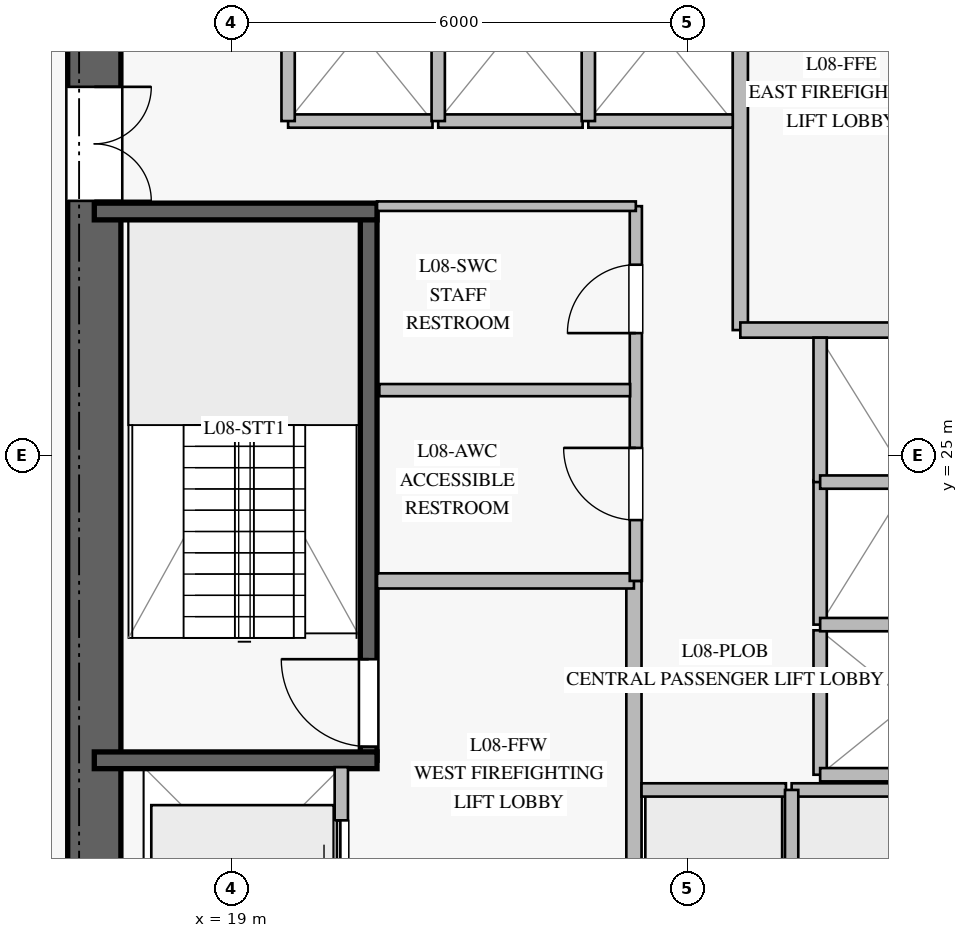
"""IFC4 building model, lengths in metres.
Left out: names, types, materials, properties, quantities, classifications, styles, units other than length and angle.
Written with IfcOpenShell. Run it as: python <this file> out.ifc"""

import sys

from ifc_helpers import new_model, si_unit, direction, frame, frame_2d, origin, place, context, subcontext, project, spatial, rectangle, extrude, element, fill, save


model = new_model("IFC4")
c1 = context("Model", 3, precision=1e-05, world=origin(), true_north=direction((0.0, 1.0)))
c2 = subcontext(c1, "Body", "Model", "MODEL_VIEW")
j1 = project(units=[si_unit("LENGTHUNIT", "METRE"), si_unit("PLANEANGLEUNIT", "RADIAN")], contexts=[c1])
p1 = place(None, origin())
s1 = spatial("IfcSite", under=j1, at=p1, CompositionType="ELEMENT")
p2 = place(p1, origin())
s2 = spatial("IfcBuilding", under=s1, at=p2, CompositionType="ELEMENT")
p3 = place(p2, frame((0.0, 0.0, 36.0)))
s3 = spatial("IfcBuildingStorey", under=s2, at=p3, CompositionType="ELEMENT", Elevation=36.0)
p4 = place(p3, frame((17.2, 31.85, 0.0), z_axis=(0.0, 0.0, 1.0), x_axis=(0.0, -1.0, 0.0)))
e1 = element("IfcWall", 1, at=p4, inside=s3, PredefinedType="SHEAR", context=c2, shape_type="SweptSolid", body=[
    extrude(rectangle(XDim=13.7, YDim=0.7, at=frame_2d((6.85, 0.0))), origin(), (0.0, 0.0, 1.0), 3.76),
])
p5 = place(p4, frame((2.0, 0.0, 0.0)))
e2 = element("IfcOpeningElement", 2, at=p5, cuts=e1, PredefinedType="OPENING", context=c2, shape_type="SweptSolid", body=[
    extrude(rectangle(XDim=1.5, YDim=2.2, at=frame_2d((0.75, 1.1))), frame((0.0, 0.36, 0.0), z_axis=(0.0, -1.0, 0.0), x_axis=(1.0, 0.0, 0.0)), (0.0, 0.0, 1.0), 0.72),
])
p6 = place(p3, frame((20.81, 20.99, 0.0), z_axis=(0.0, 0.0, 1.0), x_axis=(0.0, 1.0, 0.0)))
e3 = element("IfcWall", 3, at=p6, inside=s3, PredefinedType="SOLIDWALL", context=c2, shape_type="SweptSolid", body=[
    extrude(rectangle(XDim=7.22, YDim=0.22, at=frame_2d((3.61, 0.0))), origin(), (0.0, 0.0, 1.0), 3.76),
])
p7 = place(p6, frame((0.18, 0.0, 0.0)))
e4 = element("IfcOpeningElement", 4, at=p7, cuts=e3, PredefinedType="OPENING", context=c2, shape_type="SweptSolid", body=[
    extrude(rectangle(XDim=1.15, YDim=2.2, at=frame_2d((0.575, 1.1))), frame((0.0, 0.12, 0.0), z_axis=(0.0, -1.0, 0.0), x_axis=(1.0, 0.0, 0.0)), (0.0, 0.0, 1.0), 0.24),
])
for number, where, z_axis, x_axis in (
    (5, (17.2, 20.99, 0.0), (0.0, 0.0, 1.0), (1.0, 0.0, 0.0)),
    (6, (17.2, 28.21, 0.0), (0.0, 0.0, 1.0), (1.0, 0.0, 0.0)),
):
    element("IfcWall", number, at=place(p3, frame(where, z_axis=z_axis, x_axis=x_axis)), inside=s3, PredefinedType="SOLIDWALL", context=c2, shape_type="SweptSolid", body=[
        extrude(rectangle(XDim=3.72, YDim=0.22, at=frame_2d((1.86, 0.0))), origin(), (0.0, 0.0, 1.0), 3.76),
    ])
p8 = place(p3, frame((24.3, 18.2, 0.0), z_axis=(0.0, 0.0, 1.0), x_axis=(0.0, 1.0, 0.0)))
e7 = element("IfcWall", 7, at=p8, inside=s3, PredefinedType="PARTITIONING", context=c2, shape_type="SweptSolid", body=[
    extrude(rectangle(XDim=5.15, YDim=0.2, at=frame_2d((2.575, 0.0))), origin(), (0.0, 0.0, 1.0), 3.76),
])
p9 = place(p3, frame((20.92, 23.35, 0.0), z_axis=(0.0, 0.0, 1.0), x_axis=(1.0, 0.0, 0.0)))
e8 = element("IfcWall", 8, at=p9, inside=s3, PredefinedType="PARTITIONING", context=c2, shape_type="SweptSolid", body=[
    extrude(rectangle(XDim=3.38, YDim=0.2, at=frame_2d((1.69, 0.0))), origin(), (0.0, 0.0, 1.0), 3.76),
])
p10 = place(p3, frame((25.7, 26.65, 0.0), z_axis=(0.0, 0.0, 1.0), x_axis=(0.0, 1.0, 0.0)))
e9 = element("IfcWall", 9, at=p10, inside=s3, PredefinedType="PARTITIONING", context=c2, shape_type="SweptSolid", body=[
    extrude(rectangle(XDim=5.15, YDim=0.2, at=frame_2d((2.575, 0.0))), origin(), (0.0, 0.0, 1.0), 3.76),
])
p11 = place(p3, frame((25.7, 26.65, 0.0), z_axis=(0.0, 0.0, 1.0), x_axis=(1.0, 0.0, 0.0)))
e10 = element("IfcWall", 10, at=p11, inside=s3, PredefinedType="PARTITIONING", context=c2, shape_type="SweptSolid", body=[
    extrude(rectangle(XDim=3.38, YDim=0.2, at=frame_2d((1.69, 0.0))), origin(), (0.0, 0.0, 1.0), 3.76),
])
p12 = place(p3, frame((24.325, 23.35, 0.0), z_axis=(0.0, 0.0, 1.0), x_axis=(0.0, 1.0, 0.0)))
e11 = element("IfcWall", 11, at=p12, inside=s3, PredefinedType="PLUMBINGWALL", context=c2, shape_type="SweptSolid", body=[
    extrude(rectangle(XDim=4.93, YDim=0.16, at=frame_2d((2.465, 0.0))), origin(), (0.0, 0.0, 1.0), 3.76),
])
p13 = place(p12, frame((0.8, 0.0, 0.0)))
e12 = element("IfcOpeningElement", 12, at=p13, cuts=e11, PredefinedType="OPENING", context=c2, shape_type="SweptSolid", body=[
    extrude(rectangle(XDim=0.95, YDim=2.1, at=frame_2d((0.475, 1.05))), frame((0.0, 0.09, 0.0), z_axis=(0.0, -1.0, 0.0), x_axis=(1.0, 0.0, 0.0)), (0.0, 0.0, 1.0), 0.18),
])
p14 = place(p12, frame((3.26, 0.0, 0.0)))
e13 = element("IfcOpeningElement", 13, at=p14, cuts=e11, PredefinedType="OPENING", context=c2, shape_type="SweptSolid", body=[
    extrude(rectangle(XDim=0.9, YDim=2.1, at=frame_2d((0.45, 1.05))), frame((0.0, 0.09, 0.0), z_axis=(0.0, -1.0, 0.0), x_axis=(1.0, 0.0, 0.0)), (0.0, 0.0, 1.0), 0.18),
])
p15 = place(p3, frame((20.92, 28.28, 0.0), z_axis=(0.0, 0.0, 1.0), x_axis=(1.0, 0.0, 0.0)))
e14 = element("IfcWall", 14, at=p15, inside=s3, PredefinedType="PARTITIONING", context=c2, shape_type="SweptSolid", body=[
    extrude(rectangle(XDim=3.405, YDim=0.125, at=frame_2d((1.703, 0.0))), origin(), (0.0, 0.0, 1.0), 3.76),
])
p16 = place(p3, frame((20.95, 25.86, 0.0), z_axis=(0.0, 0.0, 1.0), x_axis=(1.0, 0.0, 0.0)))
e15 = element("IfcWall", 15, at=p16, inside=s3, PredefinedType="PLUMBINGWALL", context=c2, shape_type="SweptSolid", body=[
    extrude(rectangle(XDim=3.3, YDim=0.16, at=frame_2d((1.65, 0.0))), origin(), (0.0, 0.0, 1.0), 3.76),
])
p17 = place(p3, frame((24.4, 20.6, 0.0), z_axis=(0.0, 0.0, 1.0), x_axis=(1.0, 0.0, 0.0)))
e16 = element("IfcWall", 16, at=p17, inside=s3, PredefinedType="PARTITIONING", context=c2, shape_type="SweptSolid", body=[
    extrude(rectangle(XDim=1.9, YDim=0.175, at=frame_2d((0.95, 0.0))), origin(), (0.0, 0.0, 1.0), 3.76),
])
p18 = place(p3, frame((26.375, 20.6, 0.0), z_axis=(0.0, 0.0, 1.0), x_axis=(1.0, 0.0, 0.0)))
e17 = element("IfcWall", 17, at=p18, inside=s3, PredefinedType="PARTITIONING", context=c2, shape_type="SweptSolid", body=[
    extrude(rectangle(XDim=1.9, YDim=0.175, at=frame_2d((0.95, 0.0))), origin(), (0.0, 0.0, 1.0), 3.76),
])
p19 = place(p3, frame((26.375, 18.25, 0.0), z_axis=(0.0, 0.0, 1.0), x_axis=(0.0, 1.0, 0.0)))
e18 = element("IfcWall", 18, at=p19, inside=s3, PredefinedType="PARTITIONING", context=c2, shape_type="SweptSolid", body=[
    extrude(rectangle(XDim=2.35, YDim=0.175, at=frame_2d((1.175, 0.0))), origin(), (0.0, 0.0, 1.0), 3.76),
])
p20 = place(p3, frame((19.75, 29.4, 0.0), z_axis=(0.0, 0.0, 1.0), x_axis=(1.0, 0.0, 0.0)))
e19 = element("IfcWall", 19, at=p20, inside=s3, PredefinedType="PARTITIONING", context=c2, shape_type="SweptSolid", body=[
    extrude(rectangle(XDim=1.9, YDim=0.175, at=frame_2d((0.95, 0.0))), origin(), (0.0, 0.0, 1.0), 3.76),
])
p21 = place(p3, frame((19.75, 29.4, 0.0), z_axis=(0.0, 0.0, 1.0), x_axis=(0.0, 1.0, 0.0)))
e20 = element("IfcWall", 20, at=p21, inside=s3, PredefinedType="PARTITIONING", context=c2, shape_type="SweptSolid", body=[
    extrude(rectangle(XDim=2.35, YDim=0.175, at=frame_2d((1.175, 0.0))), origin(), (0.0, 0.0, 1.0), 3.76),
])
p22 = place(p3, frame((21.725, 29.4, 0.0), z_axis=(0.0, 0.0, 1.0), x_axis=(1.0, 0.0, 0.0)))
e21 = element("IfcWall", 21, at=p22, inside=s3, PredefinedType="PARTITIONING", context=c2, shape_type="SweptSolid", body=[
    extrude(rectangle(XDim=1.9, YDim=0.175, at=frame_2d((0.95, 0.0))), origin(), (0.0, 0.0, 1.0), 3.76),
])
p23 = place(p3, frame((21.725, 29.4, 0.0), z_axis=(0.0, 0.0, 1.0), x_axis=(0.0, 1.0, 0.0)))
e22 = element("IfcWall", 22, at=p23, inside=s3, PredefinedType="PARTITIONING", context=c2, shape_type="SweptSolid", body=[
    extrude(rectangle(XDim=2.35, YDim=0.175, at=frame_2d((1.175, 0.0))), origin(), (0.0, 0.0, 1.0), 3.76),
])
p24 = place(p3, frame((23.7, 29.4, 0.0), z_axis=(0.0, 0.0, 1.0), x_axis=(1.0, 0.0, 0.0)))
e23 = element("IfcWall", 23, at=p24, inside=s3, PredefinedType="PARTITIONING", context=c2, shape_type="SweptSolid", body=[
    extrude(rectangle(XDim=1.9, YDim=0.175, at=frame_2d((0.95, 0.0))), origin(), (0.0, 0.0, 1.0), 3.76),
])
p25 = place(p3, frame((23.7, 29.4, 0.0), z_axis=(0.0, 0.0, 1.0), x_axis=(0.0, 1.0, 0.0)))
e24 = element("IfcWall", 24, at=p25, inside=s3, PredefinedType="PARTITIONING", context=c2, shape_type="SweptSolid", body=[
    extrude(rectangle(XDim=2.35, YDim=0.175, at=frame_2d((1.175, 0.0))), origin(), (0.0, 0.0, 1.0), 3.76),
])
p26 = place(p3, frame((26.75, 20.8, 0.0), z_axis=(0.0, 0.0, 1.0), x_axis=(0.0, 1.0, 0.0)))
e25 = element("IfcWall", 25, at=p26, inside=s3, PredefinedType="PARTITIONING", context=c2, shape_type="SweptSolid", body=[
    extrude(rectangle(XDim=1.9, YDim=0.175, at=frame_2d((0.95, 0.0))), origin(), (0.0, 0.0, 1.0), 3.76),
])
p27 = place(p3, frame((26.75, 20.8, 0.0), z_axis=(0.0, 0.0, 1.0), x_axis=(1.0, 0.0, 0.0)))
e26 = element("IfcWall", 26, at=p27, inside=s3, PredefinedType="PARTITIONING", context=c2, shape_type="SweptSolid", body=[
    extrude(rectangle(XDim=2.35, YDim=0.175, at=frame_2d((1.175, 0.0))), origin(), (0.0, 0.0, 1.0), 3.76),
])
p28 = place(p3, frame((26.75, 22.775, 0.0), z_axis=(0.0, 0.0, 1.0), x_axis=(0.0, 1.0, 0.0)))
e27 = element("IfcWall", 27, at=p28, inside=s3, PredefinedType="PARTITIONING", context=c2, shape_type="SweptSolid", body=[
    extrude(rectangle(XDim=1.9, YDim=0.175, at=frame_2d((0.95, 0.0))), origin(), (0.0, 0.0, 1.0), 3.76),
])
p29 = place(p3, frame((26.75, 22.775, 0.0), z_axis=(0.0, 0.0, 1.0), x_axis=(1.0, 0.0, 0.0)))
e28 = element("IfcWall", 28, at=p29, inside=s3, PredefinedType="PARTITIONING", context=c2, shape_type="SweptSolid", body=[
    extrude(rectangle(XDim=2.35, YDim=0.175, at=frame_2d((1.175, 0.0))), origin(), (0.0, 0.0, 1.0), 3.76),
])
p30 = place(p3, frame((26.75, 24.65, 0.0), z_axis=(0.0, 0.0, 1.0), x_axis=(0.0, 1.0, 0.0)))
e29 = element("IfcWall", 29, at=p30, inside=s3, PredefinedType="PARTITIONING", context=c2, shape_type="SweptSolid", body=[
    extrude(rectangle(XDim=1.9, YDim=0.175, at=frame_2d((0.95, 0.0))), origin(), (0.0, 0.0, 1.0), 3.76),
])
p31 = place(p3, frame((26.75, 24.65, 0.0), z_axis=(0.0, 0.0, 1.0), x_axis=(1.0, 0.0, 0.0)))
e30 = element("IfcWall", 30, at=p31, inside=s3, PredefinedType="PARTITIONING", context=c2, shape_type="SweptSolid", body=[
    extrude(rectangle(XDim=2.35, YDim=0.175, at=frame_2d((1.175, 0.0))), origin(), (0.0, 0.0, 1.0), 3.76),
])
p32 = place(p3, frame((20.45, 18.3, 0.0), z_axis=(0.0, 0.0, 1.0), x_axis=(0.0, 1.0, 0.0)))
e31 = element("IfcWall", 31, at=p32, inside=s3, PredefinedType="PARTITIONING", context=c2, shape_type="SweptSolid", body=[
    extrude(rectangle(XDim=2.6, YDim=0.175, at=frame_2d((1.3, 0.0))), origin(), (0.0, 0.0, 1.0), 3.76),
])
p33 = place(p32, frame((0.7, 0.0, 0.0)))
e32 = element("IfcOpeningElement", 32, at=p33, cuts=e31, PredefinedType="OPENING", context=c2, shape_type="SweptSolid", body=[
    extrude(rectangle(XDim=1.2, YDim=2.2, at=frame_2d((0.6, 1.1))), frame((0.0, 0.098, 0.0), z_axis=(0.0, -1.0, 0.0), x_axis=(1.0, 0.0, 0.0)), (0.0, 0.0, 1.0), 0.195),
])
p34 = place(p7, origin())
e33 = element("IfcDoor", 33, at=p34, inside=s3, OperationType="SINGLE_SWING_RIGHT", PredefinedType="DOOR", context=c2, shape_type="SweptSolid", body=[
    extrude(rectangle(XDim=1.15, YDim=2.2, at=frame_2d((0.575, 1.1))), frame((0.0, 0.025, 0.0), z_axis=(0.0, -1.0, 0.0), x_axis=(1.0, 0.0, 0.0)), (0.0, 0.0, 1.0), 0.05),
])
fill(e4, e33)
p35 = place(p5, origin())
e34 = element("IfcDoor", 34, at=p35, inside=s3, OperationType="DOUBLE_DOOR_SINGLE_SWING", PredefinedType="DOOR", context=c2, shape_type="SweptSolid", body=[
    extrude(rectangle(XDim=1.5, YDim=2.2, at=frame_2d((0.75, 1.1))), frame((0.0, 0.025, 0.0), z_axis=(0.0, -1.0, 0.0), x_axis=(1.0, 0.0, 0.0)), (0.0, 0.0, 1.0), 0.05),
])
fill(e2, e34)
p36 = place(p13, origin())
e35 = element("IfcDoor", 35, at=p36, inside=s3, OperationType="SINGLE_SWING_RIGHT", PredefinedType="DOOR", context=c2, shape_type="SweptSolid", body=[
    extrude(rectangle(XDim=0.95, YDim=2.1, at=frame_2d((0.475, 1.05))), frame((0.0, 0.025, 0.0), z_axis=(0.0, -1.0, 0.0), x_axis=(1.0, 0.0, 0.0)), (0.0, 0.0, 1.0), 0.05),
])
fill(e12, e35)
p37 = place(p14, origin())
e36 = element("IfcDoor", 36, at=p37, inside=s3, OperationType="SINGLE_SWING_LEFT", PredefinedType="DOOR", context=c2, shape_type="SweptSolid", body=[
    extrude(rectangle(XDim=0.9, YDim=2.1, at=frame_2d((0.45, 1.05))), frame((0.0, 0.025, 0.0), z_axis=(0.0, -1.0, 0.0), x_axis=(1.0, 0.0, 0.0)), (0.0, 0.0, 1.0), 0.05),
])
fill(e13, e36)
p38 = place(p33, origin())
e37 = element("IfcDoor", 37, at=p38, inside=s3, OperationType="DOUBLE_DOOR_SLIDING", PredefinedType="DOOR", context=c2, shape_type="SweptSolid", body=[
    extrude(rectangle(XDim=1.2, YDim=2.2, at=frame_2d((0.6, 1.1))), frame((0.0, 0.025, 0.0), z_axis=(0.0, -1.0, 0.0), x_axis=(1.0, 0.0, 0.0)), (0.0, 0.0, 1.0), 0.05),
])
fill(e32, e37)
save(model, sys.argv[1])
